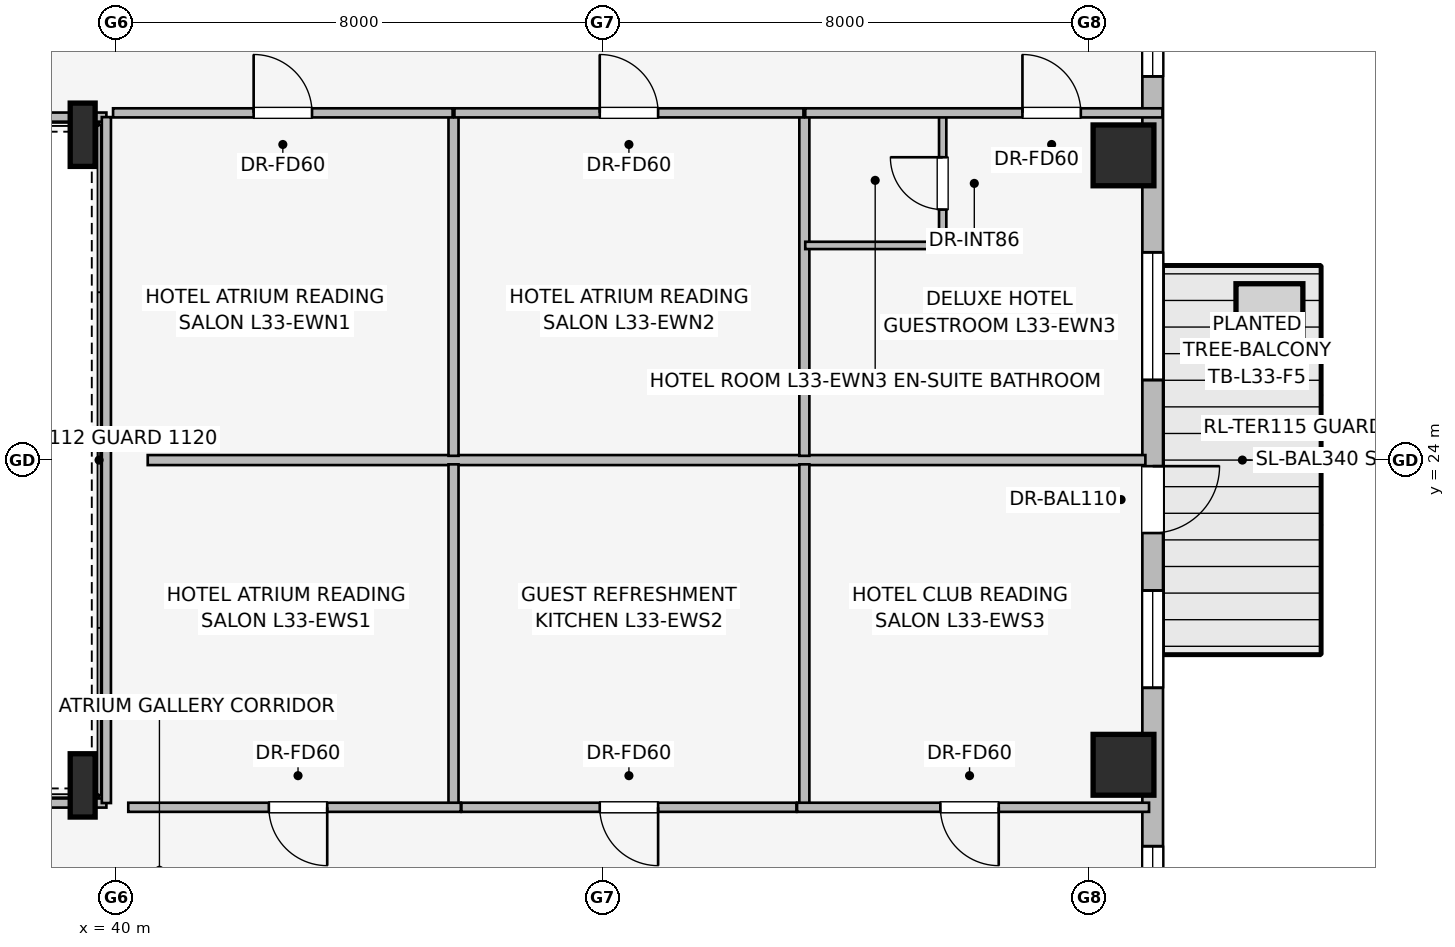
"""IFC4 building model, lengths in metres.
Left out: names, types, materials, properties, quantities, classifications, styles, units other than length and angle.
Written with IfcOpenShell. Run it as: python <this file> out.ifc"""

import sys

from ifc_helpers import new_model, si_unit, direction, frame, frame_2d, origin, origin_2d, place, context, subcontext, project, spatial, rectangle, i_section, extrude, element, fill, save


model = new_model("IFC4")
c1 = context("Model", 3, precision=1e-05, world=origin(), true_north=direction((0.0, 1.0)))
c2 = subcontext(c1, "Body", "Model", "MODEL_VIEW")
j1 = project(units=[si_unit("LENGTHUNIT", "METRE"), si_unit("PLANEANGLEUNIT", "RADIAN")], contexts=[c1])
p1 = place(None, origin())
s1 = spatial("IfcSite", under=j1, at=p1, CompositionType="ELEMENT")
p2 = place(p1, origin())
s2 = spatial("IfcBuilding", under=s1, at=p2, CompositionType="ELEMENT")
p3 = place(p2, frame((0.0, 0.0, 125.7)))
s3 = spatial("IfcBuildingStorey", under=s2, at=p3, CompositionType="ELEMENT", Elevation=125.7)
for number, where, z_axis, x_axis in (
    (1, (56.568, 18.989, 0.0), (0.0, 0.0, 1.0), (1.0, 0.0, 0.0)),
    (2, (56.568, 29.011, 0.0), (0.0, 0.0, 1.0), (1.0, 0.0, 0.0)),
):
    element("IfcColumn", number, at=place(p3, frame(where, z_axis=z_axis, x_axis=x_axis)), inside=s3, PredefinedType="COLUMN", context=c2, shape_type="SweptSolid", body=[
        extrude(rectangle(XDim=1.0, YDim=1.0, at=origin_2d()), origin(), (0.0, 0.0, 1.0), 3.45),
    ])
for number, where, z_axis, x_axis in (
    (3, (39.45, 18.65, 0.0), (0.0, 0.0, 1.0), (1.0, 0.0, 0.0)),
    (4, (39.45, 29.35, 0.0), (0.0, 0.0, 1.0), (1.0, 0.0, 0.0)),
):
    element("IfcColumn", number, at=place(p3, frame(where, z_axis=z_axis, x_axis=x_axis)), inside=s3, PredefinedType="COLUMN", context=c2, shape_type="SweptSolid", body=[
        extrude(i_section(OverallWidth=0.41, OverallDepth=1.041, WebThickness=0.031, FlangeThickness=0.056, at=origin_2d()), origin(), (0.0, 0.0, 1.0), 3.45),
    ])
p4 = place(p3, frame((57.048, 32.352, 0.0), z_axis=(0.0, 0.0, 1.0), x_axis=(0.0, -1.0, 0.0)))
e5 = element("IfcWall", 5, at=p4, inside=s3, PredefinedType="STANDARD", context=c2, shape_type="SweptSolid", body=[
    extrude(rectangle(XDim=16.704, YDim=0.34, at=frame_2d((8.352, 0.0))), origin(), (0.0, 0.0, 1.0), 3.19),
])
p5 = place(p4, frame((8.452, 0.0, 0.0)))
e6 = element("IfcOpeningElement", 6, at=p5, cuts=e5, PredefinedType="OPENING", context=c2, shape_type="SweptSolid", body=[
    extrude(rectangle(XDim=1.1, YDim=2.04, at=frame_2d((0.55, 1.02))), frame((0.0, 0.18, 0.0), z_axis=(0.0, -1.0, 0.0), x_axis=(1.0, 0.0, 0.0)), (0.0, 0.0, 1.0), 0.36),
])
p6 = place(p4, frame((0.992, 0.0, 0.75)))
e7 = element("IfcOpeningElement", 7, at=p6, cuts=e5, PredefinedType="OPENING", context=c2, shape_type="SweptSolid", body=[
    extrude(rectangle(XDim=1.05, YDim=1.4, at=frame_2d((0.525, 0.7))), frame((0.0, 0.18, 0.0), z_axis=(0.0, -1.0, 0.0), x_axis=(1.0, 0.0, 0.0)), (0.0, 0.0, 1.0), 0.36),
])
p7 = place(p4, frame((4.935, 0.0, 0.75)))
e8 = element("IfcOpeningElement", 8, at=p7, cuts=e5, PredefinedType="OPENING", context=c2, shape_type="SweptSolid", body=[
    extrude(rectangle(XDim=2.1, YDim=1.5, at=frame_2d((1.05, 0.75))), frame((0.0, 0.18, 0.0), z_axis=(0.0, -1.0, 0.0), x_axis=(1.0, 0.0, 0.0)), (0.0, 0.0, 1.0), 0.36),
])
p8 = place(p4, frame((10.497, 0.0, 0.75)))
e9 = element("IfcOpeningElement", 9, at=p8, cuts=e5, PredefinedType="OPENING", context=c2, shape_type="SweptSolid", body=[
    extrude(rectangle(XDim=1.6, YDim=1.55, at=frame_2d((0.8, 0.775))), frame((0.0, 0.18, 0.0), z_axis=(0.0, -1.0, 0.0), x_axis=(1.0, 0.0, 0.0)), (0.0, 0.0, 1.0), 0.36),
])
p9 = place(p4, frame((14.702, 0.0, 0.75)))
e10 = element("IfcOpeningElement", 10, at=p9, cuts=e5, PredefinedType="OPENING", context=c2, shape_type="SweptSolid", body=[
    extrude(rectangle(XDim=1.05, YDim=1.4, at=frame_2d((0.525, 0.7))), frame((0.0, 0.18, 0.0), z_axis=(0.0, -1.0, 0.0), x_axis=(1.0, 0.0, 0.0)), (0.0, 0.0, 1.0), 0.36),
])
p10 = place(p3, frame((27.675, 18.36, 0.0), z_axis=(0.0, 0.0, 1.0), x_axis=(1.0, 0.0, 0.0)))
e11 = element("IfcWall", 11, at=p10, inside=s3, PredefinedType="PARTITIONING", context=c2, shape_type="SweptSolid", body=[
    extrude(rectangle(XDim=12.165, YDim=0.15, at=frame_2d((6.083, 0.0))), origin(), (0.0, 0.0, 1.0), 2.331),
])
p11 = place(p3, frame((39.84, 29.64, 0.0), z_axis=(0.0, 0.0, 1.0), x_axis=(-1.0, 0.0, 0.0)))
e12 = element("IfcWall", 12, at=p11, inside=s3, PredefinedType="PARTITIONING", context=c2, shape_type="SweptSolid", body=[
    extrude(rectangle(XDim=12.2, YDim=0.15, at=frame_2d((6.1, 0.0))), origin(), (0.0, 0.0, 1.0), 2.331),
])
p12 = place(p3, frame((39.84, 18.36, 0.0), z_axis=(0.0, 0.0, 1.0), x_axis=(0.0, 1.0, 0.0)))
e13 = element("IfcWall", 13, at=p12, inside=s3, PredefinedType="PARTITIONING", context=c2, shape_type="SweptSolid", body=[
    extrude(rectangle(XDim=11.28, YDim=0.15, at=frame_2d((5.64, 0.0))), origin(), (0.0, 0.0, 1.0), 3.19),
])
p13 = place(p3, frame((40.52, 24.0, 0.0), z_axis=(0.0, 0.0, 1.0), x_axis=(1.0, 0.0, 0.0)))
e14 = element("IfcWall", 14, at=p13, inside=s3, PredefinedType="PARTITIONING", context=c2, shape_type="SweptSolid", body=[
    extrude(rectangle(XDim=16.408, YDim=0.165, at=frame_2d((8.204, 0.0))), origin(), (0.0, 0.0, 1.0), 3.19),
])
for number, where, z_axis, x_axis in (
    (15, (45.549, 24.07, 0.0), (0.0, 0.0, 1.0), (0.0, 1.0, 0.0)),
    (16, (51.319, 24.07, 0.0), (0.0, 0.0, 1.0), (0.0, 1.0, 0.0)),
):
    element("IfcWall", number, at=place(p3, frame(where, z_axis=z_axis, x_axis=x_axis)), inside=s3, PredefinedType="PARTITIONING", context=c2, shape_type="SweptSolid", body=[
        extrude(rectangle(XDim=5.64, YDim=0.165, at=frame_2d((2.82, 0.0))), origin(), (0.0, 0.0, 1.0), 3.19),
    ])
p14 = place(p3, frame((39.95, 29.71, 0.0), z_axis=(0.0, 0.0, 1.0), x_axis=(1.0, 0.0, 0.0)))
e17 = element("IfcWall", 17, at=p14, inside=s3, PredefinedType="PARTITIONING", context=c2, shape_type="SweptSolid", body=[
    extrude(rectangle(XDim=5.584, YDim=0.15, at=frame_2d((2.792, 0.0))), origin(), (0.0, 0.0, 1.0), 3.19),
])
p15 = place(p14, frame((2.312, 0.0, 0.0)))
e18 = element("IfcOpeningElement", 18, at=p15, cuts=e17, PredefinedType="OPENING", context=c2, shape_type="SweptSolid", body=[
    extrude(rectangle(XDim=0.96, YDim=2.0, at=frame_2d((0.48, 1.0))), frame((0.0, 0.085, 0.0), z_axis=(0.0, -1.0, 0.0), x_axis=(1.0, 0.0, 0.0)), (0.0, 0.0, 1.0), 0.17),
])
p16 = place(p3, frame((45.564, 29.71, 0.0), z_axis=(0.0, 0.0, 1.0), x_axis=(1.0, 0.0, 0.0)))
e19 = element("IfcWall", 19, at=p16, inside=s3, PredefinedType="PARTITIONING", context=c2, shape_type="SweptSolid", body=[
    extrude(rectangle(XDim=5.74, YDim=0.15, at=frame_2d((2.87, 0.0))), origin(), (0.0, 0.0, 1.0), 3.19),
])
p17 = place(p16, frame((2.39, 0.0, 0.0)))
e20 = element("IfcOpeningElement", 20, at=p17, cuts=e19, PredefinedType="OPENING", context=c2, shape_type="SweptSolid", body=[
    extrude(rectangle(XDim=0.96, YDim=2.0, at=frame_2d((0.48, 1.0))), frame((0.0, 0.085, 0.0), z_axis=(0.0, -1.0, 0.0), x_axis=(1.0, 0.0, 0.0)), (0.0, 0.0, 1.0), 0.17),
])
p18 = place(p3, frame((53.594, 27.47, 0.0), z_axis=(0.0, 0.0, 1.0), x_axis=(0.0, 1.0, 0.0)))
e21 = element("IfcWall", 21, at=p18, inside=s3, PredefinedType="PARTITIONING", context=c2, shape_type="SweptSolid", body=[
    extrude(rectangle(XDim=2.24, YDim=0.12, at=frame_2d((1.12, 0.0))), origin(), (0.0, 0.0, 1.0), 3.19),
])
p19 = place(p18, frame((0.65, 0.0, 0.0)))
e22 = element("IfcOpeningElement", 22, at=p19, cuts=e21, PredefinedType="OPENING", context=c2, shape_type="SweptSolid", body=[
    extrude(rectangle(XDim=0.86, YDim=2.0, at=frame_2d((0.43, 1.0))), frame((0.0, 0.07, 0.0), z_axis=(0.0, -1.0, 0.0), x_axis=(1.0, 0.0, 0.0)), (0.0, 0.0, 1.0), 0.14),
])
p20 = place(p3, frame((51.334, 27.53, 0.0), z_axis=(0.0, 0.0, 1.0), x_axis=(1.0, 0.0, 0.0)))
e23 = element("IfcWall", 23, at=p20, inside=s3, PredefinedType="PARTITIONING", context=c2, shape_type="SweptSolid", body=[
    extrude(rectangle(XDim=2.32, YDim=0.12, at=frame_2d((1.16, 0.0))), origin(), (0.0, 0.0, 1.0), 3.19),
])
p21 = place(p3, frame((51.334, 29.71, 0.0), z_axis=(0.0, 0.0, 1.0), x_axis=(1.0, 0.0, 0.0)))
e24 = element("IfcWall", 24, at=p21, inside=s3, PredefinedType="PARTITIONING", context=c2, shape_type="SweptSolid", body=[
    extrude(rectangle(XDim=5.874, YDim=0.15, at=frame_2d((2.937, 0.0))), origin(), (0.0, 0.0, 1.0), 3.19),
])
p22 = place(p21, frame((3.572, 0.0, 0.0)))
e25 = element("IfcOpeningElement", 25, at=p22, cuts=e24, PredefinedType="OPENING", context=c2, shape_type="SweptSolid", body=[
    extrude(rectangle(XDim=0.96, YDim=2.0, at=frame_2d((0.48, 1.0))), frame((0.0, 0.085, 0.0), z_axis=(0.0, -1.0, 0.0), x_axis=(1.0, 0.0, 0.0)), (0.0, 0.0, 1.0), 0.17),
])
for number, where, z_axis, x_axis in (
    (26, (45.549, 18.29, 0.0), (0.0, 0.0, 1.0), (0.0, 1.0, 0.0)),
    (27, (51.319, 18.29, 0.0), (0.0, 0.0, 1.0), (0.0, 1.0, 0.0)),
):
    element("IfcWall", number, at=place(p3, frame(where, z_axis=z_axis, x_axis=x_axis)), inside=s3, PredefinedType="PARTITIONING", context=c2, shape_type="SweptSolid", body=[
        extrude(rectangle(XDim=5.64, YDim=0.165, at=frame_2d((2.82, 0.0))), origin(), (0.0, 0.0, 1.0), 3.19),
    ])
p23 = place(p3, frame((45.669, 18.29, 0.0), z_axis=(0.0, 0.0, 1.0), x_axis=(-1.0, 0.0, 0.0)))
e28 = element("IfcWall", 28, at=p23, inside=s3, PredefinedType="PARTITIONING", context=c2, shape_type="SweptSolid", body=[
    extrude(rectangle(XDim=5.469, YDim=0.15, at=frame_2d((2.734, 0.0))), origin(), (0.0, 0.0, 1.0), 3.19),
])
p24 = place(p23, frame((2.197, 0.0, 0.0)))
e29 = element("IfcOpeningElement", 29, at=p24, cuts=e28, PredefinedType="OPENING", context=c2, shape_type="SweptSolid", body=[
    extrude(rectangle(XDim=0.96, YDim=2.0, at=frame_2d((0.48, 1.0))), frame((0.0, 0.085, 0.0), z_axis=(0.0, -1.0, 0.0), x_axis=(1.0, 0.0, 0.0)), (0.0, 0.0, 1.0), 0.17),
])
p25 = place(p3, frame((51.189, 18.29, 0.0), z_axis=(0.0, 0.0, 1.0), x_axis=(-1.0, 0.0, 0.0)))
e30 = element("IfcWall", 30, at=p25, inside=s3, PredefinedType="PARTITIONING", context=c2, shape_type="SweptSolid", body=[
    extrude(rectangle(XDim=5.51, YDim=0.15, at=frame_2d((2.755, 0.0))), origin(), (0.0, 0.0, 1.0), 3.19),
])
p26 = place(p25, frame((2.275, 0.0, 0.0)))
e31 = element("IfcOpeningElement", 31, at=p26, cuts=e30, PredefinedType="OPENING", context=c2, shape_type="SweptSolid", body=[
    extrude(rectangle(XDim=0.96, YDim=2.0, at=frame_2d((0.48, 1.0))), frame((0.0, 0.085, 0.0), z_axis=(0.0, -1.0, 0.0), x_axis=(1.0, 0.0, 0.0)), (0.0, 0.0, 1.0), 0.17),
])
p27 = place(p3, frame((56.988, 18.29, 0.0), z_axis=(0.0, 0.0, 1.0), x_axis=(-1.0, 0.0, 0.0)))
e32 = element("IfcWall", 32, at=p27, inside=s3, PredefinedType="PARTITIONING", context=c2, shape_type="SweptSolid", body=[
    extrude(rectangle(XDim=5.789, YDim=0.15, at=frame_2d((2.895, 0.0))), origin(), (0.0, 0.0, 1.0), 3.19),
])
p28 = place(p27, frame((2.472, 0.0, 0.0)))
e33 = element("IfcOpeningElement", 33, at=p28, cuts=e32, PredefinedType="OPENING", context=c2, shape_type="SweptSolid", body=[
    extrude(rectangle(XDim=0.96, YDim=2.0, at=frame_2d((0.48, 1.0))), frame((0.0, 0.085, 0.0), z_axis=(0.0, -1.0, 0.0), x_axis=(1.0, 0.0, 0.0)), (0.0, 0.0, 1.0), 0.17),
])
p29 = place(p5, origin())
e34 = element("IfcDoor", 34, at=p29, inside=s3, OperationType="SINGLE_SWING_LEFT", PredefinedType="DOOR", context=c2, shape_type="SweptSolid", body=[
    extrude(rectangle(XDim=1.1, YDim=2.04, at=frame_2d((0.55, 1.02))), frame((0.0, 0.025, 0.0), z_axis=(0.0, -1.0, 0.0), x_axis=(1.0, 0.0, 0.0)), (0.0, 0.0, 1.0), 0.05),
])
fill(e6, e34)
p30 = place(p6, origin())
e35 = element("IfcWindow", 35, at=p30, inside=s3, PartitioningType="SINGLE_PANEL", PredefinedType="WINDOW", context=c2, shape_type="SweptSolid", body=[
    extrude(rectangle(XDim=1.05, YDim=1.4, at=frame_2d((0.525, 0.7))), frame((0.0, 0.03, 0.0), z_axis=(0.0, -1.0, 0.0), x_axis=(1.0, 0.0, 0.0)), (0.0, 0.0, 1.0), 0.06),
])
fill(e7, e35)
p31 = place(p7, origin())
e36 = element("IfcWindow", 36, at=p31, inside=s3, PartitioningType="SINGLE_PANEL", PredefinedType="WINDOW", context=c2, shape_type="SweptSolid", body=[
    extrude(rectangle(XDim=2.1, YDim=1.5, at=frame_2d((1.05, 0.75))), frame((0.0, 0.03, 0.0), z_axis=(0.0, -1.0, 0.0), x_axis=(1.0, 0.0, 0.0)), (0.0, 0.0, 1.0), 0.06),
])
fill(e8, e36)
p32 = place(p8, origin())
e37 = element("IfcWindow", 37, at=p32, inside=s3, PartitioningType="SINGLE_PANEL", PredefinedType="WINDOW", context=c2, shape_type="SweptSolid", body=[
    extrude(rectangle(XDim=1.6, YDim=1.55, at=frame_2d((0.8, 0.775))), frame((0.0, 0.03, 0.0), z_axis=(0.0, -1.0, 0.0), x_axis=(1.0, 0.0, 0.0)), (0.0, 0.0, 1.0), 0.06),
])
fill(e9, e37)
p33 = place(p9, origin())
e38 = element("IfcWindow", 38, at=p33, inside=s3, PartitioningType="SINGLE_PANEL", PredefinedType="WINDOW", context=c2, shape_type="SweptSolid", body=[
    extrude(rectangle(XDim=1.05, YDim=1.4, at=frame_2d((0.525, 0.7))), frame((0.0, 0.03, 0.0), z_axis=(0.0, -1.0, 0.0), x_axis=(1.0, 0.0, 0.0)), (0.0, 0.0, 1.0), 0.06),
])
fill(e10, e38)
p34 = place(p15, origin())
e39 = element("IfcDoor", 39, at=p34, inside=s3, OperationType="SINGLE_SWING_LEFT", PredefinedType="DOOR", context=c2, shape_type="SweptSolid", body=[
    extrude(rectangle(XDim=0.96, YDim=2.0, at=frame_2d((0.48, 1.0))), frame((0.0, 0.025, 0.0), z_axis=(0.0, -1.0, 0.0), x_axis=(1.0, 0.0, 0.0)), (0.0, 0.0, 1.0), 0.05),
])
fill(e18, e39)
p35 = place(p17, origin())
e40 = element("IfcDoor", 40, at=p35, inside=s3, OperationType="SINGLE_SWING_LEFT", PredefinedType="DOOR", context=c2, shape_type="SweptSolid", body=[
    extrude(rectangle(XDim=0.96, YDim=2.0, at=frame_2d((0.48, 1.0))), frame((0.0, 0.025, 0.0), z_axis=(0.0, -1.0, 0.0), x_axis=(1.0, 0.0, 0.0)), (0.0, 0.0, 1.0), 0.05),
])
fill(e20, e40)
p36 = place(p19, origin())
e41 = element("IfcDoor", 41, at=p36, inside=s3, OperationType="SINGLE_SWING_RIGHT", PredefinedType="DOOR", context=c2, shape_type="SweptSolid", body=[
    extrude(rectangle(XDim=0.86, YDim=2.0, at=frame_2d((0.43, 1.0))), frame((0.0, 0.025, 0.0), z_axis=(0.0, -1.0, 0.0), x_axis=(1.0, 0.0, 0.0)), (0.0, 0.0, 1.0), 0.05),
])
fill(e22, e41)
p37 = place(p22, origin())
e42 = element("IfcDoor", 42, at=p37, inside=s3, OperationType="SINGLE_SWING_LEFT", PredefinedType="DOOR", context=c2, shape_type="SweptSolid", body=[
    extrude(rectangle(XDim=0.96, YDim=2.0, at=frame_2d((0.48, 1.0))), frame((0.0, 0.025, 0.0), z_axis=(0.0, -1.0, 0.0), x_axis=(1.0, 0.0, 0.0)), (0.0, 0.0, 1.0), 0.05),
])
fill(e25, e42)
p38 = place(p24, origin())
e43 = element("IfcDoor", 43, at=p38, inside=s3, OperationType="SINGLE_SWING_LEFT", PredefinedType="DOOR", context=c2, shape_type="SweptSolid", body=[
    extrude(rectangle(XDim=0.96, YDim=2.0, at=frame_2d((0.48, 1.0))), frame((0.0, 0.025, 0.0), z_axis=(0.0, -1.0, 0.0), x_axis=(1.0, 0.0, 0.0)), (0.0, 0.0, 1.0), 0.05),
])
fill(e29, e43)
p39 = place(p26, origin())
e44 = element("IfcDoor", 44, at=p39, inside=s3, OperationType="SINGLE_SWING_LEFT", PredefinedType="DOOR", context=c2, shape_type="SweptSolid", body=[
    extrude(rectangle(XDim=0.96, YDim=2.0, at=frame_2d((0.48, 1.0))), frame((0.0, 0.025, 0.0), z_axis=(0.0, -1.0, 0.0), x_axis=(1.0, 0.0, 0.0)), (0.0, 0.0, 1.0), 0.05),
])
fill(e31, e44)
p40 = place(p28, origin())
e45 = element("IfcDoor", 45, at=p40, inside=s3, OperationType="SINGLE_SWING_LEFT", PredefinedType="DOOR", context=c2, shape_type="SweptSolid", body=[
    extrude(rectangle(XDim=0.96, YDim=2.0, at=frame_2d((0.48, 1.0))), frame((0.0, 0.025, 0.0), z_axis=(0.0, -1.0, 0.0), x_axis=(1.0, 0.0, 0.0)), (0.0, 0.0, 1.0), 0.05),
])
fill(e33, e45)
save(model, sys.argv[1])
